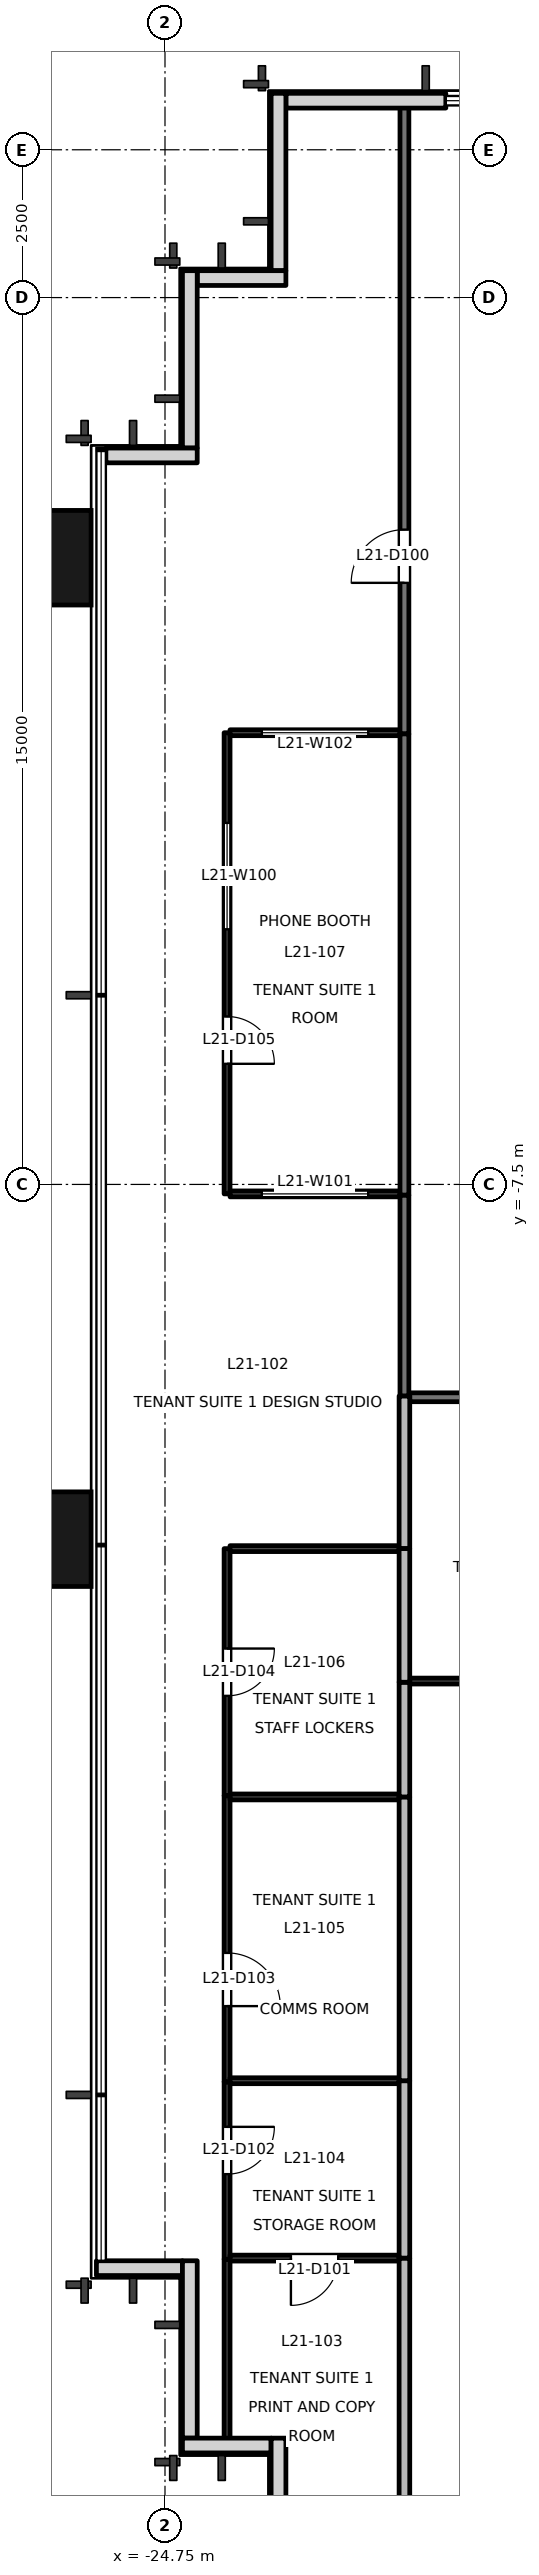
"""IFC4 building model, lengths in metres.
Left out: names, types, materials, properties, quantities, classifications, styles, units other than length and angle.
Written with IfcOpenShell. Run it as: python <this file> out.ifc"""

import sys

from ifc_helpers import new_model, si_unit, direction, frame, frame_2d, origin, origin_2d, place, context, subcontext, project, spatial, rectangle, extrude, element, fill, save


model = new_model("IFC4")
c1 = context("Model", 3, precision=1e-05, world=origin(), true_north=direction((0.0, 1.0)))
c2 = subcontext(c1, "Body", "Model", "MODEL_VIEW")
j1 = project(units=[si_unit("LENGTHUNIT", "METRE"), si_unit("PLANEANGLEUNIT", "RADIAN")], contexts=[c1])
p1 = place(None, origin())
s1 = spatial("IfcSite", under=j1, at=p1, CompositionType="ELEMENT")
p2 = place(p1, origin())
s2 = spatial("IfcBuilding", under=s1, at=p2, CompositionType="ELEMENT")
p3 = place(p2, frame((0.0, 0.0, 95.7)))
s3 = spatial("IfcBuildingStorey", under=s2, at=p3, CompositionType="ELEMENT", Elevation=95.7)
for number, where, z_axis, x_axis in (
    (1, (-26.9, -13.5, -0.2), (0.0, 0.0, 1.0), (0.0, 1.0, 0.0)),
    (2, (-26.9, 3.1, -0.2), (0.0, 0.0, 1.0), (0.0, 1.0, 0.0)),
):
    element("IfcColumn", number, at=place(p3, frame(where, z_axis=z_axis, x_axis=x_axis)), inside=s3, PredefinedType="COLUMN", context=c2, shape_type="SweptSolid", body=[
        extrude(rectangle(XDim=1.6, YDim=1.8, at=origin_2d()), origin(), (0.0, 0.0, 1.0), 4.0),
    ])
p4 = place(p3, frame((-20.0, 10.83, 0.0), z_axis=(0.0, 0.0, 1.0), x_axis=(-1.0, 0.0, 0.0)))
e3 = element("IfcWall", 3, at=p4, inside=s3, PredefinedType="SOLIDWALL", context=c2, shape_type="SweptSolid", body=[
    extrude(rectangle(XDim=2.705, YDim=0.25, at=frame_2d((1.353, 0.0))), origin(), (0.0, 0.0, 1.0), 3.8),
])
p5 = place(p3, frame((-22.83, 10.955, 0.0), z_axis=(0.0, 0.0, 1.0), x_axis=(0.0, -1.0, 0.0)))
e4 = element("IfcWall", 4, at=p5, inside=s3, PredefinedType="SOLIDWALL", context=c2, shape_type="SweptSolid", body=[
    extrude(rectangle(XDim=3.0, YDim=0.25, at=frame_2d((1.5, 0.0))), origin(), (0.0, 0.0, 1.0), 3.8),
])
p6 = place(p3, frame((-22.705, 7.83, 0.0), z_axis=(0.0, 0.0, 1.0), x_axis=(-1.0, 0.0, 0.0)))
e5 = element("IfcWall", 5, at=p6, inside=s3, PredefinedType="SOLIDWALL", context=c2, shape_type="SweptSolid", body=[
    extrude(rectangle(XDim=1.5, YDim=0.25, at=frame_2d((0.75, 0.0))), origin(), (0.0, 0.0, 1.0), 3.8),
])
p7 = place(p3, frame((-24.33, 7.955, 0.0), z_axis=(0.0, 0.0, 1.0), x_axis=(0.0, -1.0, 0.0)))
e6 = element("IfcWall", 6, at=p7, inside=s3, PredefinedType="SOLIDWALL", context=c2, shape_type="SweptSolid", body=[
    extrude(rectangle(XDim=3.0, YDim=0.25, at=frame_2d((1.5, 0.0))), origin(), (0.0, 0.0, 1.0), 3.8),
])
p8 = place(p3, frame((-24.205, 4.83, 0.0), z_axis=(0.0, 0.0, 1.0), x_axis=(-1.0, 0.0, 0.0)))
e7 = element("IfcWall", 7, at=p8, inside=s3, PredefinedType="SOLIDWALL", context=c2, shape_type="SweptSolid", body=[
    extrude(rectangle(XDim=1.545, YDim=0.25, at=frame_2d((0.772, 0.0))), origin(), (0.0, 0.0, 1.0), 3.8),
])
p9 = place(p3, frame((-25.91, -25.83, 0.0), z_axis=(0.0, 0.0, 1.0), x_axis=(1.0, 0.0, 0.0)))
e8 = element("IfcWall", 8, at=p9, inside=s3, PredefinedType="SOLIDWALL", context=c2, shape_type="SweptSolid", body=[
    extrude(rectangle(XDim=1.455, YDim=0.25, at=frame_2d((0.728, 0.0))), origin(), (0.0, 0.0, 1.0), 3.8),
])
p10 = place(p3, frame((-24.33, -25.705, 0.0), z_axis=(0.0, 0.0, 1.0), x_axis=(0.0, -1.0, 0.0)))
e9 = element("IfcWall", 9, at=p10, inside=s3, PredefinedType="SOLIDWALL", context=c2, shape_type="SweptSolid", body=[
    extrude(rectangle(XDim=3.0, YDim=0.25, at=frame_2d((1.5, 0.0))), origin(), (0.0, 0.0, 1.0), 3.8),
])
p11 = place(p3, frame((-24.455, -28.83, 0.0), z_axis=(0.0, 0.0, 1.0), x_axis=(1.0, 0.0, 0.0)))
e10 = element("IfcWall", 10, at=p11, inside=s3, PredefinedType="SOLIDWALL", context=c2, shape_type="SweptSolid", body=[
    extrude(rectangle(XDim=1.5, YDim=0.25, at=frame_2d((0.75, 0.0))), origin(), (0.0, 0.0, 1.0), 3.8),
])
p12 = place(p3, frame((-22.83, -28.705, 0.0), z_axis=(0.0, 0.0, 1.0), x_axis=(0.0, -1.0, 0.0)))
e11 = element("IfcWall", 11, at=p12, inside=s3, PredefinedType="SOLIDWALL", context=c2, shape_type="SweptSolid", body=[
    extrude(rectangle(XDim=3.0, YDim=0.25, at=frame_2d((1.5, 0.0))), origin(), (0.0, 0.0, 1.0), 3.8),
])
p13 = place(p3, frame((-20.7, -11.08, 0.0), z_axis=(0.0, 0.0, 1.0), x_axis=(0.0, 1.0, 0.0)))
e12 = element("IfcWall", 12, at=p13, inside=s3, PredefinedType="PARTITIONING", context=c2, shape_type="SweptSolid", body=[
    extrude(rectangle(XDim=3.4, YDim=0.15, at=frame_2d((1.7, 0.0))), origin(), (0.0, 0.0, 1.0), 3.8),
])
p14 = place(p3, frame((-20.7, 0.12, 0.0), z_axis=(0.0, 0.0, 1.0), x_axis=(0.0, 1.0, 0.0)))
e13 = element("IfcWall", 13, at=p14, inside=s3, PredefinedType="PARTITIONING", context=c2, shape_type="SweptSolid", body=[
    extrude(rectangle(XDim=10.62, YDim=0.15, at=frame_2d((5.31, 0.0))), origin(), (0.0, 0.0, 1.0), 3.4),
])
p15 = place(p14, frame((2.555, 0.0, 0.0)))
e14 = element("IfcOpeningElement", 14, at=p15, cuts=e13, PredefinedType="OPENING", context=c2, shape_type="SweptSolid", body=[
    extrude(rectangle(XDim=0.9, YDim=2.1, at=frame_2d((0.45, 1.05))), frame((0.0, 0.085, 0.0), z_axis=(0.0, -1.0, 0.0), x_axis=(1.0, 0.0, 0.0)), (0.0, 0.0, 1.0), 0.171),
])
p16 = place(p3, frame((-20.7, -7.68, 0.0), z_axis=(0.0, 0.0, 1.0), x_axis=(0.0, 1.0, 0.0)))
e15 = element("IfcWall", 15, at=p16, inside=s3, PredefinedType="PARTITIONING", context=c2, shape_type="SweptSolid", body=[
    extrude(rectangle(XDim=7.8, YDim=0.15, at=frame_2d((3.9, 0.0))), origin(), (0.0, 0.0, 1.0), 3.4),
])
p17 = place(p3, frame((-15.056, -11.1, 0.0), z_axis=(0.0, 0.0, 1.0), x_axis=(-1.0, 0.0, 0.0)))
e16 = element("IfcWall", 16, at=p17, inside=s3, PredefinedType="PARTITIONING", context=c2, shape_type="SweptSolid", body=[
    extrude(rectangle(XDim=5.554, YDim=0.15, at=frame_2d((2.777, 0.0))), origin(), (0.0, 0.0, 1.0), 3.8),
])
p18 = place(p3, frame((-23.7, -25.68, 0.0), z_axis=(0.0, 0.0, 1.0), x_axis=(0.0, -1.0, 0.0)))
e17 = element("IfcWall", 17, at=p18, inside=s3, PredefinedType="PARTITIONING", context=c2, shape_type="SweptSolid", body=[
    extrude(rectangle(XDim=3.06, YDim=0.1, at=frame_2d((1.53, 0.0))), origin(), (0.0, 0.0, 1.0), 3.8),
])
p19 = place(p3, frame((-23.7, -22.68, 0.0), z_axis=(0.0, 0.0, 1.0), x_axis=(0.0, -1.0, 0.0)))
e18 = element("IfcWall", 18, at=p19, inside=s3, PredefinedType="PARTITIONING", context=c2, shape_type="SweptSolid", body=[
    extrude(rectangle(XDim=3.0, YDim=0.1, at=frame_2d((1.5, 0.0))), origin(), (0.0, 0.0, 1.0), 3.8),
])
p20 = place(p19, frame((0.76, 0.0, 0.0)))
e19 = element("IfcOpeningElement", 19, at=p20, cuts=e18, PredefinedType="OPENING", context=c2, shape_type="SweptSolid", body=[
    extrude(rectangle(XDim=0.8, YDim=2.1, at=frame_2d((0.4, 1.05))), frame((0.0, 0.061, 0.0), z_axis=(0.0, -1.0, 0.0), x_axis=(1.0, 0.0, 0.0)), (0.0, 0.0, 1.0), 0.121),
])
p21 = place(p3, frame((-23.7, -17.84, 0.0), z_axis=(0.0, 0.0, 1.0), x_axis=(0.0, -1.0, 0.0)))
e20 = element("IfcWall", 20, at=p21, inside=s3, PredefinedType="PARTITIONING", context=c2, shape_type="SweptSolid", body=[
    extrude(rectangle(XDim=4.84, YDim=0.1, at=frame_2d((2.42, 0.0))), origin(), (0.0, 0.0, 1.0), 3.8),
])
p22 = place(p21, frame((2.658, 0.0, 0.0)))
e21 = element("IfcOpeningElement", 21, at=p22, cuts=e20, PredefinedType="OPENING", context=c2, shape_type="SweptSolid", body=[
    extrude(rectangle(XDim=0.9, YDim=2.1, at=frame_2d((0.45, 1.05))), frame((0.0, 0.061, 0.0), z_axis=(0.0, -1.0, 0.0), x_axis=(1.0, 0.0, 0.0)), (0.0, 0.0, 1.0), 0.121),
])
p23 = place(p3, frame((-23.7, -13.66, 0.0), z_axis=(0.0, 0.0, 1.0), x_axis=(0.0, -1.0, 0.0)))
e22 = element("IfcWall", 22, at=p23, inside=s3, PredefinedType="PARTITIONING", context=c2, shape_type="SweptSolid", body=[
    extrude(rectangle(XDim=4.18, YDim=0.1, at=frame_2d((2.09, 0.0))), origin(), (0.0, 0.0, 1.0), 3.8),
])
p24 = place(p23, frame((1.69, 0.0, 0.0)))
e23 = element("IfcOpeningElement", 23, at=p24, cuts=e22, PredefinedType="OPENING", context=c2, shape_type="SweptSolid", body=[
    extrude(rectangle(XDim=0.8, YDim=2.1, at=frame_2d((0.4, 1.05))), frame((0.0, 0.061, 0.0), z_axis=(0.0, -1.0, 0.0), x_axis=(1.0, 0.0, 0.0)), (0.0, 0.0, 1.0), 0.121),
])
p25 = place(p3, frame((-20.79, -13.66, 0.0), z_axis=(0.0, 0.0, 1.0), x_axis=(-1.0, 0.0, 0.0)))
e24 = element("IfcWall", 24, at=p25, inside=s3, PredefinedType="PARTITIONING", context=c2, shape_type="SweptSolid", body=[
    extrude(rectangle(XDim=2.86, YDim=0.1, at=frame_2d((1.43, 0.0))), origin(), (0.0, 0.0, 1.0), 3.8),
])
p26 = place(p3, frame((-23.7, 0.14, 0.0), z_axis=(0.0, 0.0, 1.0), x_axis=(0.0, -1.0, 0.0)))
e25 = element("IfcWall", 25, at=p26, inside=s3, PredefinedType="PARTITIONING", context=c2, shape_type="SweptSolid", body=[
    extrude(rectangle(XDim=7.8, YDim=0.1, at=frame_2d((3.9, 0.0))), origin(), (0.0, 0.0, 1.0), 3.4),
])
p27 = place(p26, frame((4.8, 0.0, 0.0)))
e26 = element("IfcOpeningElement", 26, at=p27, cuts=e25, PredefinedType="OPENING", context=c2, shape_type="SweptSolid", body=[
    extrude(rectangle(XDim=0.8, YDim=2.1, at=frame_2d((0.4, 1.05))), frame((0.0, 0.061, 0.0), z_axis=(0.0, -1.0, 0.0), x_axis=(1.0, 0.0, 0.0)), (0.0, 0.0, 1.0), 0.121),
])
p28 = place(p26, frame((1.525, 0.0, 0.9)))
e27 = element("IfcOpeningElement", 27, at=p28, cuts=e25, PredefinedType="OPENING", context=c2, shape_type="SweptSolid", body=[
    extrude(rectangle(XDim=1.8, YDim=1.2, at=frame_2d((0.9, 0.6))), frame((0.0, 0.061, 0.0), z_axis=(0.0, -1.0, 0.0), x_axis=(1.0, 0.0, 0.0)), (0.0, 0.0, 1.0), 0.121),
])
p29 = place(p3, frame((-23.65, -7.66, 0.0), z_axis=(0.0, 0.0, 1.0), x_axis=(1.0, 0.0, 0.0)))
e28 = element("IfcWall", 28, at=p29, inside=s3, PredefinedType="PARTITIONING", context=c2, shape_type="SweptSolid", body=[
    extrude(rectangle(XDim=2.875, YDim=0.1, at=frame_2d((1.438, 0.0))), origin(), (0.0, 0.0, 1.0), 3.8),
])
p30 = place(p29, frame((0.537, 0.0, 0.9)))
e29 = element("IfcOpeningElement", 29, at=p30, cuts=e28, PredefinedType="OPENING", context=c2, shape_type="SweptSolid", body=[
    extrude(rectangle(XDim=1.8, YDim=1.2, at=frame_2d((0.9, 0.6))), frame((0.0, 0.061, 0.0), z_axis=(0.0, -1.0, 0.0), x_axis=(1.0, 0.0, 0.0)), (0.0, 0.0, 1.0), 0.121),
])
p31 = place(p3, frame((-20.775, 0.14, 0.0), z_axis=(0.0, 0.0, 1.0), x_axis=(-1.0, 0.0, 0.0)))
e30 = element("IfcWall", 30, at=p31, inside=s3, PredefinedType="PARTITIONING", context=c2, shape_type="SweptSolid", body=[
    extrude(rectangle(XDim=2.875, YDim=0.1, at=frame_2d((1.438, 0.0))), origin(), (0.0, 0.0, 1.0), 3.8),
])
p32 = place(p31, frame((0.537, 0.0, 0.9)))
e31 = element("IfcOpeningElement", 31, at=p32, cuts=e30, PredefinedType="OPENING", context=c2, shape_type="SweptSolid", body=[
    extrude(rectangle(XDim=1.8, YDim=1.2, at=frame_2d((0.9, 0.6))), frame((0.0, 0.061, 0.0), z_axis=(0.0, -1.0, 0.0), x_axis=(1.0, 0.0, 0.0)), (0.0, 0.0, 1.0), 0.121),
])
p33 = place(p3, frame((-20.7, -11.08, 0.0), z_axis=(0.0, 0.0, 1.0), x_axis=(0.0, -1.0, 0.0)))
e32 = element("IfcWall", 32, at=p33, inside=s3, PredefinedType="PARTITIONING", context=c2, shape_type="SweptSolid", body=[
    extrude(rectangle(XDim=2.58, YDim=0.18, at=frame_2d((1.29, 0.0))), origin(), (0.0, 0.0, 1.0), 3.8),
])
p34 = place(p3, frame((-20.79, -25.66, 0.0), z_axis=(0.0, 0.0, 1.0), x_axis=(-1.0, 0.0, 0.0)))
e33 = element("IfcWall", 33, at=p34, inside=s3, PredefinedType="PARTITIONING", context=c2, shape_type="SweptSolid", body=[
    extrude(rectangle(XDim=2.86, YDim=0.1, at=frame_2d((1.43, 0.0))), origin(), (0.0, 0.0, 1.0), 3.8),
])
p35 = place(p34, frame((1.03, 0.0, 0.0)))
e34 = element("IfcOpeningElement", 34, at=p35, cuts=e33, PredefinedType="OPENING", context=c2, shape_type="SweptSolid", body=[
    extrude(rectangle(XDim=0.8, YDim=2.1, at=frame_2d((0.4, 1.05))), frame((0.0, 0.061, 0.0), z_axis=(0.0, -1.0, 0.0), x_axis=(1.0, 0.0, 0.0)), (0.0, 0.0, 1.0), 0.121),
])
p36 = place(p3, frame((-20.7, -25.66, 0.0), z_axis=(0.0, 0.0, 1.0), x_axis=(0.0, -1.0, 0.0)))
e35 = element("IfcWall", 35, at=p36, inside=s3, PredefinedType="PARTITIONING", context=c2, shape_type="SweptSolid", body=[
    extrude(rectangle(XDim=6.08, YDim=0.18, at=frame_2d((3.04, 0.0))), origin(), (0.0, 0.0, 1.0), 3.8),
])
p37 = place(p3, frame((-23.65, -22.66, 0.0), z_axis=(0.0, 0.0, 1.0), x_axis=(1.0, 0.0, 0.0)))
e36 = element("IfcWall", 36, at=p37, inside=s3, PredefinedType="PARTITIONING", context=c2, shape_type="SweptSolid", body=[
    extrude(rectangle(XDim=2.86, YDim=0.1, at=frame_2d((1.43, 0.0))), origin(), (0.0, 0.0, 1.0), 3.8),
])
p38 = place(p3, frame((-20.7, -22.66, 0.0), z_axis=(0.0, 0.0, 1.0), x_axis=(0.0, -1.0, 0.0)))
e37 = element("IfcWall", 37, at=p38, inside=s3, PredefinedType="PARTITIONING", context=c2, shape_type="SweptSolid", body=[
    extrude(rectangle(XDim=3.0, YDim=0.18, at=frame_2d((1.5, 0.0))), origin(), (0.0, 0.0, 1.0), 3.8),
])
p39 = place(p3, frame((-23.65, -17.86, 0.0), z_axis=(0.0, 0.0, 1.0), x_axis=(1.0, 0.0, 0.0)))
e38 = element("IfcWall", 38, at=p39, inside=s3, PredefinedType="PARTITIONING", context=c2, shape_type="SweptSolid", body=[
    extrude(rectangle(XDim=2.86, YDim=0.1, at=frame_2d((1.43, 0.0))), origin(), (0.0, 0.0, 1.0), 3.8),
])
p40 = place(p3, frame((-20.7, -17.86, 0.0), z_axis=(0.0, 0.0, 1.0), x_axis=(0.0, -1.0, 0.0)))
e39 = element("IfcWall", 39, at=p40, inside=s3, PredefinedType="PARTITIONING", context=c2, shape_type="SweptSolid", body=[
    extrude(rectangle(XDim=4.8, YDim=0.18, at=frame_2d((2.4, 0.0))), origin(), (0.0, 0.0, 1.0), 3.8),
])
p41 = place(p3, frame((-20.7, -15.92, 0.0), z_axis=(0.0, 0.0, 1.0), x_axis=(0.0, -1.0, 0.0)))
e40 = element("IfcWall", 40, at=p41, inside=s3, PredefinedType="PARTITIONING", context=c2, shape_type="SweptSolid", body=[
    extrude(rectangle(XDim=1.94, YDim=0.18, at=frame_2d((0.97, 0.0))), origin(), (0.0, 0.0, 1.0), 3.8),
])
p42 = place(p3, frame((-20.7, -13.66, 0.0), z_axis=(0.0, 0.0, 1.0), x_axis=(0.0, -1.0, 0.0)))
e41 = element("IfcWall", 41, at=p42, inside=s3, PredefinedType="PARTITIONING", context=c2, shape_type="SweptSolid", body=[
    extrude(rectangle(XDim=2.26, YDim=0.18, at=frame_2d((1.13, 0.0))), origin(), (0.0, 0.0, 1.0), 3.8),
])
p43 = place(p3, frame((-20.61, -15.9, 0.0), z_axis=(0.0, 0.0, 1.0), x_axis=(1.0, 0.0, 0.0)))
e42 = element("IfcWall", 42, at=p43, inside=s3, PredefinedType="PARTITIONING", context=c2, shape_type="SweptSolid", body=[
    extrude(rectangle(XDim=5.534, YDim=0.1, at=frame_2d((2.767, 0.0))), origin(), (0.0, 0.0, 1.0), 3.8),
])
p44 = place(p43, frame((1.49, 0.0, 0.0)))
e43 = element("IfcOpeningElement", 43, at=p44, cuts=e42, PredefinedType="OPENING", context=c2, shape_type="SweptSolid", body=[
    extrude(rectangle(XDim=0.9, YDim=2.1, at=frame_2d((0.45, 1.05))), frame((0.0, 0.061, 0.0), z_axis=(0.0, -1.0, 0.0), x_axis=(1.0, 0.0, 0.0)), (0.0, 0.0, 1.0), 0.121),
])
p45 = place(p15, origin())
e44 = element("IfcDoor", 44, at=p45, inside=s3, OperationType="SINGLE_SWING_LEFT", PredefinedType="DOOR", context=c2, shape_type="SweptSolid", body=[
    extrude(rectangle(XDim=0.9, YDim=2.1, at=frame_2d((0.45, 1.05))), frame((0.0, 0.025, 0.0), z_axis=(0.0, -1.0, 0.0), x_axis=(1.0, 0.0, 0.0)), (0.0, 0.0, 1.0), 0.05),
])
fill(e14, e44)
p46 = place(p35, origin())
e45 = element("IfcDoor", 45, at=p46, inside=s3, OperationType="SINGLE_SWING_RIGHT", PredefinedType="DOOR", context=c2, shape_type="SweptSolid", body=[
    extrude(rectangle(XDim=0.8, YDim=2.1, at=frame_2d((0.4, 1.05))), frame((0.0, 0.025, 0.0), z_axis=(0.0, -1.0, 0.0), x_axis=(1.0, 0.0, 0.0)), (0.0, 0.0, 1.0), 0.05),
])
fill(e34, e45)
p47 = place(p20, origin())
e46 = element("IfcDoor", 46, at=p47, inside=s3, OperationType="SINGLE_SWING_LEFT", PredefinedType="DOOR", context=c2, shape_type="SweptSolid", body=[
    extrude(rectangle(XDim=0.8, YDim=2.1, at=frame_2d((0.4, 1.05))), frame((0.0, 0.025, 0.0), z_axis=(0.0, -1.0, 0.0), x_axis=(1.0, 0.0, 0.0)), (0.0, 0.0, 1.0), 0.05),
])
fill(e19, e46)
p48 = place(p22, origin())
e47 = element("IfcDoor", 47, at=p48, inside=s3, OperationType="SINGLE_SWING_RIGHT", PredefinedType="DOOR", context=c2, shape_type="SweptSolid", body=[
    extrude(rectangle(XDim=0.9, YDim=2.1, at=frame_2d((0.45, 1.05))), frame((0.0, 0.025, 0.0), z_axis=(0.0, -1.0, 0.0), x_axis=(1.0, 0.0, 0.0)), (0.0, 0.0, 1.0), 0.05),
])
fill(e21, e47)
p49 = place(p24, origin())
e48 = element("IfcDoor", 48, at=p49, inside=s3, OperationType="SINGLE_SWING_LEFT", PredefinedType="DOOR", context=c2, shape_type="SweptSolid", body=[
    extrude(rectangle(XDim=0.8, YDim=2.1, at=frame_2d((0.4, 1.05))), frame((0.0, 0.025, 0.0), z_axis=(0.0, -1.0, 0.0), x_axis=(1.0, 0.0, 0.0)), (0.0, 0.0, 1.0), 0.05),
])
fill(e23, e48)
p50 = place(p27, origin())
e49 = element("IfcDoor", 49, at=p50, inside=s3, OperationType="SINGLE_SWING_RIGHT", PredefinedType="DOOR", context=c2, shape_type="SweptSolid", body=[
    extrude(rectangle(XDim=0.8, YDim=2.1, at=frame_2d((0.4, 1.05))), frame((0.0, 0.025, 0.0), z_axis=(0.0, -1.0, 0.0), x_axis=(1.0, 0.0, 0.0)), (0.0, 0.0, 1.0), 0.05),
])
fill(e26, e49)
p51 = place(p28, origin())
e50 = element("IfcWindow", 50, at=p51, inside=s3, PartitioningType="SINGLE_PANEL", PredefinedType="WINDOW", context=c2, shape_type="SweptSolid", body=[
    extrude(rectangle(XDim=1.8, YDim=1.2, at=frame_2d((0.9, 0.6))), frame((0.0, 0.03, 0.0), z_axis=(0.0, -1.0, 0.0), x_axis=(1.0, 0.0, 0.0)), (0.0, 0.0, 1.0), 0.06),
])
fill(e27, e50)
p52 = place(p30, origin())
e51 = element("IfcWindow", 51, at=p52, inside=s3, PartitioningType="SINGLE_PANEL", PredefinedType="WINDOW", context=c2, shape_type="SweptSolid", body=[
    extrude(rectangle(XDim=1.8, YDim=1.2, at=frame_2d((0.9, 0.6))), frame((0.0, 0.03, 0.0), z_axis=(0.0, -1.0, 0.0), x_axis=(1.0, 0.0, 0.0)), (0.0, 0.0, 1.0), 0.06),
])
fill(e29, e51)
p53 = place(p32, origin())
e52 = element("IfcWindow", 52, at=p53, inside=s3, PartitioningType="SINGLE_PANEL", PredefinedType="WINDOW", context=c2, shape_type="SweptSolid", body=[
    extrude(rectangle(XDim=1.8, YDim=1.2, at=frame_2d((0.9, 0.6))), frame((0.0, 0.03, 0.0), z_axis=(0.0, -1.0, 0.0), x_axis=(1.0, 0.0, 0.0)), (0.0, 0.0, 1.0), 0.06),
])
fill(e31, e52)
save(model, sys.argv[1])
